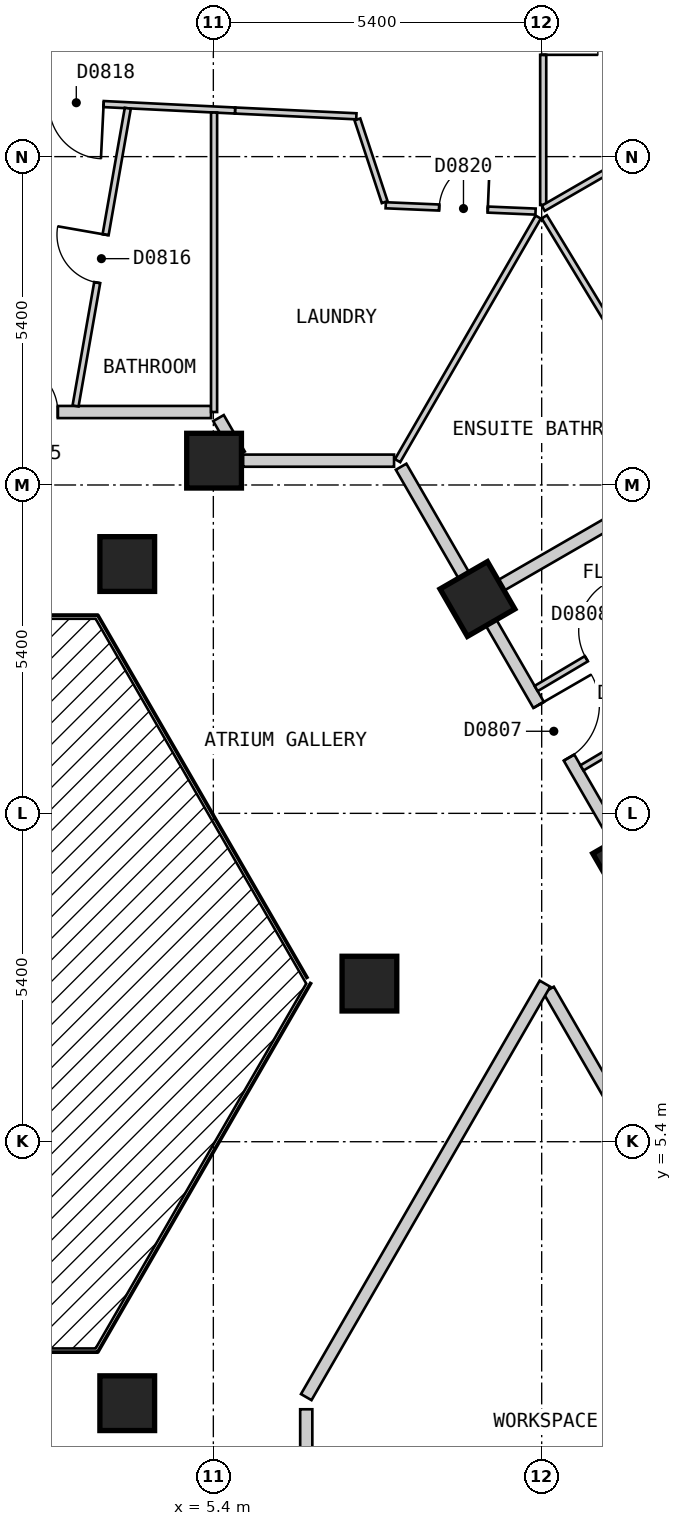
"""IFC4 building model, lengths in metres.
Left out: names, types, materials, properties, quantities, classifications, styles, units other than length and angle.
Written with IfcOpenShell. Run it as: python <this file> out.ifc"""

import sys

from ifc_helpers import new_model, si_unit, direction, frame, frame_2d, origin, origin_2d, place, context, subcontext, project, spatial, rectangle, extrude, element, fill, save


model = new_model("IFC4")
c1 = context("Model", 3, precision=1e-05, world=origin(), true_north=direction((0.0, 1.0)))
c2 = subcontext(c1, "Body", "Model", "MODEL_VIEW")
j1 = project(units=[si_unit("LENGTHUNIT", "METRE"), si_unit("PLANEANGLEUNIT", "RADIAN")], contexts=[c1])
p1 = place(None, origin())
s1 = spatial("IfcSite", under=j1, at=p1, CompositionType="ELEMENT")
p2 = place(p1, origin())
s2 = spatial("IfcBuilding", under=s1, at=p2, CompositionType="ELEMENT")
p3 = place(p2, frame((0.0, 0.0, 84.0)))
s3 = spatial("IfcBuildingStorey", under=s2, at=p3, CompositionType="ELEMENT", Elevation=84.0)
for number, where, z_axis, x_axis in (
    (1, (3.984, 1.1, 0.0), (0.0, 0.0, 1.0), (1.0, 0.0, 0.0)),
    (2, (12.255, 9.975, 0.0), (0.0, 0.0, 1.0), (-0.5, 0.866, 0.0)),
    (3, (7.967, 8.0, 0.0), (0.0, 0.0, 1.0), (1.0, 0.0, 0.0)),
    (4, (9.743, 14.325, 0.0), (0.0, 0.0, 1.0), (-0.5, 0.866, 0.0)),
    (5, (5.412, 16.6, 0.0), (0.0, 0.0, 1.0), (-1.0, 0.0, 0.0)),
    (6, (3.984, 14.9, 0.0), (0.0, 0.0, 1.0), (1.0, 0.0, 0.0)),
):
    element("IfcColumn", number, at=place(p3, frame(where, z_axis=z_axis, x_axis=x_axis)), inside=s3, PredefinedType="COLUMN", context=c2, shape_type="SweptSolid", body=[
        extrude(rectangle(XDim=0.9, YDim=0.9, at=origin_2d()), origin(), (0.0, 0.0, 1.0), 3.0),
    ])
p4 = place(p3, frame((5.485, 17.3, 0.0), z_axis=(0.0, 0.0, 1.0), x_axis=(0.499437640892, -0.866349838611, 0.0)))
e7 = element("IfcWall", 7, at=p4, inside=s3, PredefinedType="PARTITIONING", context=c2, shape_type="SweptSolid", body=[
    extrude(rectangle(XDim=0.693, YDim=0.2, at=frame_2d((0.346, 0.0))), origin(), (0.0, 0.0, 1.0), 2.7),
])
p5 = place(p3, frame((10.913, 7.899, 0.0), z_axis=(0.0, 0.0, 1.0), x_axis=(0.500028940566, -0.866008694296, 0.0)))
e8 = element("IfcWall", 8, at=p5, inside=s3, PredefinedType="PARTITIONING", context=c2, shape_type="SweptSolid", body=[
    extrude(rectangle(XDim=10.159, YDim=0.2, at=frame_2d((5.08, 0.0))), origin(), (0.0, 0.0, 1.0), 2.7),
])
p6 = place(p5, frame((4.63, 0.0, 0.0)))
e9 = element("IfcOpeningElement", 9, at=p6, cuts=e8, PredefinedType="OPENING", context=c2, shape_type="SweptSolid", body=[
    extrude(rectangle(XDim=0.9, YDim=2.1, at=frame_2d((0.45, 1.05))), frame((0.0, 0.11, 0.0), z_axis=(0.0, -1.0, 0.0), x_axis=(1.0, 0.0, 0.0)), (0.0, 0.0, 1.0), 0.22),
])
p7 = place(p3, frame((8.488, 16.5, 0.0), z_axis=(0.0, 0.0, 1.0), x_axis=(0.499986836607, -0.86603300354, 0.0)))
e10 = element("IfcWall", 10, at=p7, inside=s3, PredefinedType="PARTITIONING", context=c2, shape_type="SweptSolid", body=[
    extrude(rectangle(XDim=20.09, YDim=0.2, at=frame_2d((10.045, 0.0))), origin(), (0.0, 0.0, 1.0), 2.7),
])
p8 = place(p7, frame((4.523, 0.0, 0.0)))
e11 = element("IfcOpeningElement", 11, at=p8, cuts=e10, PredefinedType="OPENING", context=c2, shape_type="SweptSolid", body=[
    extrude(rectangle(XDim=1.0, YDim=2.1, at=frame_2d((0.5, 1.05))), frame((0.0, 0.11, 0.0), z_axis=(0.0, -1.0, 0.0), x_axis=(1.0, 0.0, 0.0)), (0.0, 0.0, 1.0), 0.22),
])
p9 = place(p3, frame((6.928, 1.0, 0.0), z_axis=(0.0, 0.0, 1.0), x_axis=(0.0, -1.0, 0.0)))
e12 = element("IfcWall", 12, at=p9, inside=s3, PredefinedType="PARTITIONING", context=c2, shape_type="SweptSolid", body=[
    extrude(rectangle(XDim=3.699, YDim=0.2, at=frame_2d((1.85, 0.0))), origin(), (0.0, 0.0, 1.0), 2.7),
])
p10 = place(p3, frame((5.889, 16.6, 0.0), z_axis=(0.0, 0.0, 1.0), x_axis=(1.0, 0.0, 0.0)))
e13 = element("IfcWall", 13, at=p10, inside=s3, PredefinedType="PARTITIONING", context=c2, shape_type="SweptSolid", body=[
    extrude(rectangle(XDim=2.483, YDim=0.2, at=frame_2d((1.242, 0.0))), origin(), (0.0, 0.0, 1.0), 2.7),
])
p11 = place(p3, frame((1.75, 17.4, 0.0), z_axis=(0.0, 0.0, 1.0), x_axis=(1.0, 0.0, 0.0)))
e14 = element("IfcWall", 14, at=p11, inside=s3, PredefinedType="PARTITIONING", context=c2, shape_type="SweptSolid", body=[
    extrude(rectangle(XDim=3.612, YDim=0.2, at=frame_2d((1.806, 0.0))), origin(), (0.0, 0.0, 1.0), 2.7),
])
p12 = place(p11, frame((0.292, 0.0, 0.0)))
e15 = element("IfcOpeningElement", 15, at=p12, cuts=e14, PredefinedType="OPENING", context=c2, shape_type="SweptSolid", body=[
    extrude(rectangle(XDim=0.8, YDim=2.1, at=frame_2d((0.4, 1.05))), frame((0.0, 0.11, 0.0), z_axis=(0.0, -1.0, 0.0), x_axis=(1.0, 0.0, 0.0)), (0.0, 0.0, 1.0), 0.22),
])
p13 = place(p3, frame((6.928, 1.2, 0.0), z_axis=(0.0, 0.0, 1.0), x_axis=(0.500055327065, 0.865993458332, 0.0)))
e16 = element("IfcWall", 16, at=p13, inside=s3, PredefinedType="PARTITIONING", context=c2, shape_type="SweptSolid", body=[
    extrude(rectangle(XDim=7.851, YDim=0.2, at=frame_2d((3.926, 0.0))), origin(), (0.0, 0.0, 1.0), 2.7),
])
p14 = place(p3, frame((7.769, 22.212, 0.0), z_axis=(0.0, 0.0, 1.0), x_axis=(0.313312924695, -0.949649941409, 0.0)))
e17 = element("IfcWall", 17, at=p14, inside=s3, PredefinedType="PARTITIONING", context=c2, shape_type="SweptSolid", body=[
    extrude(rectangle(XDim=1.433, YDim=0.1, at=frame_2d((0.717, 0.0))), origin(), (0.0, 0.0, 1.0), 2.7),
])
p15 = place(p3, frame((10.843, 20.61, 0.0), z_axis=(0.0, 0.0, 1.0), x_axis=(0.518481125811, -0.855089072657, 0.0)))
e18 = element("IfcWall", 18, at=p15, inside=s3, PredefinedType="PARTITIONING", context=c2, shape_type="SweptSolid", body=[
    extrude(rectangle(XDim=4.795, YDim=0.1, at=frame_2d((2.397, 0.0))), origin(), (0.0, 0.0, 1.0), 2.7),
])
p16 = place(p15, frame((1.999, 0.0, 0.0)))
e19 = element("IfcOpeningElement", 19, at=p16, cuts=e18, PredefinedType="OPENING", context=c2, shape_type="SweptSolid", body=[
    extrude(rectangle(XDim=0.8, YDim=2.1, at=frame_2d((0.4, 1.05))), frame((0.0, 0.06, 0.0), z_axis=(0.0, -1.0, 0.0), x_axis=(1.0, 0.0, 0.0)), (0.0, 0.0, 1.0), 0.12),
])
p17 = place(p3, frame((8.235, 20.8, 0.0), z_axis=(0.0, 0.0, 1.0), x_axis=(0.999110277005, -0.042174096116, 0.0)))
e20 = element("IfcWall", 20, at=p17, inside=s3, PredefinedType="PARTITIONING", context=c2, shape_type="SweptSolid", body=[
    extrude(rectangle(XDim=2.466, YDim=0.1, at=frame_2d((1.233, 0.0))), origin(), (0.0, 0.0, 1.0), 2.7),
])
p18 = place(p17, frame((0.88, 0.0, 0.0)))
e21 = element("IfcOpeningElement", 21, at=p18, cuts=e20, PredefinedType="OPENING", context=c2, shape_type="SweptSolid", body=[
    extrude(rectangle(XDim=0.8, YDim=2.1, at=frame_2d((0.4, 1.05))), frame((0.0, 0.06, 0.0), z_axis=(0.0, -1.0, 0.0), x_axis=(1.0, 0.0, 0.0)), (0.0, 0.0, 1.0), 0.12),
])
p19 = place(p3, frame((5.757, 22.358, 0.0), z_axis=(0.0, 0.0, 1.0), x_axis=(0.998868690804, -0.047553533316, 0.0)))
e22 = element("IfcWall", 22, at=p19, inside=s3, PredefinedType="PARTITIONING", context=c2, shape_type="SweptSolid", body=[
    extrude(rectangle(XDim=1.997, YDim=0.1, at=frame_2d((0.999, 0.0))), origin(), (0.0, 0.0, 1.0), 2.7),
])
p20 = place(p3, frame((2.321, 22.527, 0.0), z_axis=(0.0, 0.0, 1.0), x_axis=(0.998789924329, -0.049180149038, 0.0)))
e23 = element("IfcWall", 23, at=p20, inside=s3, PredefinedType="PARTITIONING", context=c2, shape_type="SweptSolid", body=[
    extrude(rectangle(XDim=3.44, YDim=0.1, at=frame_2d((1.72, 0.0))), origin(), (0.0, 0.0, 1.0), 2.7),
])
p21 = place(p20, frame((0.376, 0.0, 0.0)))
e24 = element("IfcOpeningElement", 24, at=p21, cuts=e23, PredefinedType="OPENING", context=c2, shape_type="SweptSolid", body=[
    extrude(rectangle(XDim=0.9, YDim=2.1, at=frame_2d((0.45, 1.05))), frame((0.0, 0.06, 0.0), z_axis=(0.0, -1.0, 0.0), x_axis=(1.0, 0.0, 0.0)), (0.0, 0.0, 1.0), 0.12),
])
p22 = place(p3, frame((8.43, 16.6, 0.0), z_axis=(0.0, 0.0, 1.0), x_axis=(0.50003312339, 0.866006279142, 0.0)))
e25 = element("IfcWall", 25, at=p22, inside=s3, PredefinedType="PARTITIONING", context=c2, shape_type="SweptSolid", body=[
    extrude(rectangle(XDim=4.626, YDim=0.1, at=frame_2d((2.313, 0.0))), origin(), (0.0, 0.0, 1.0), 2.7),
])
p23 = place(p3, frame((3.134, 17.5, 0.0), z_axis=(0.0, 0.0, 1.0), x_axis=(0.172821216702, 0.984953210593, 0.0)))
e26 = element("IfcWall", 26, at=p23, inside=s3, PredefinedType="PARTITIONING", context=c2, shape_type="SweptSolid", body=[
    extrude(rectangle(XDim=4.97, YDim=0.1, at=frame_2d((2.485, 0.0))), origin(), (0.0, 0.0, 1.0), 2.7),
])
p24 = place(p23, frame((2.059, 0.0, 0.0)))
e27 = element("IfcOpeningElement", 27, at=p24, cuts=e26, PredefinedType="OPENING", context=c2, shape_type="SweptSolid", body=[
    extrude(rectangle(XDim=0.8, YDim=2.1, at=frame_2d((0.4, 1.05))), frame((0.0, 0.06, 0.0), z_axis=(0.0, -1.0, 0.0), x_axis=(1.0, 0.0, 0.0)), (0.0, 0.0, 1.0), 0.12),
])
p25 = place(p3, frame((5.412, 17.4, 0.0), z_axis=(0.0, 0.0, 1.0), x_axis=(0.0, 1.0, 0.0)))
e28 = element("IfcWall", 28, at=p25, inside=s3, PredefinedType="PARTITIONING", context=c2, shape_type="SweptSolid", body=[
    extrude(rectangle(XDim=4.925, YDim=0.1, at=frame_2d((2.462, 0.0))), origin(), (0.0, 0.0, 1.0), 2.7),
])
p26 = place(p3, frame((10.825, 20.806, 0.0), z_axis=(0.0, 0.0, 1.0), x_axis=(0.0, 1.0, 0.0)))
e29 = element("IfcWall", 29, at=p26, inside=s3, PredefinedType="PARTITIONING", context=c2, shape_type="SweptSolid", body=[
    extrude(rectangle(XDim=5.894, YDim=0.1, at=frame_2d((2.947, 0.0))), origin(), (0.0, 0.0, 1.0), 2.7),
])
p27 = place(p26, frame((2.468, 0.0, 0.0)))
e30 = element("IfcOpeningElement", 30, at=p27, cuts=e29, PredefinedType="OPENING", context=c2, shape_type="SweptSolid", body=[
    extrude(rectangle(XDim=0.9, YDim=2.1, at=frame_2d((0.45, 1.05))), frame((0.0, 0.06, 0.0), z_axis=(0.0, -1.0, 0.0), x_axis=(1.0, 0.0, 0.0)), (0.0, 0.0, 1.0), 0.12),
])
p28 = place(p3, frame((10.826, 20.75, 0.0), z_axis=(0.0, 0.0, 1.0), x_axis=(0.865986712877, 0.50006700863, 0.0)))
e31 = element("IfcWall", 31, at=p28, inside=s3, PredefinedType="PARTITIONING", context=c2, shape_type="SweptSolid", body=[
    extrude(rectangle(XDim=5.949, YDim=0.1, at=frame_2d((2.975, 0.0))), origin(), (0.0, 0.0, 1.0), 2.7),
])
p29 = place(p28, frame((2.524, 0.0, 0.0)))
e32 = element("IfcOpeningElement", 32, at=p29, cuts=e31, PredefinedType="OPENING", context=c2, shape_type="SweptSolid", body=[
    extrude(rectangle(XDim=0.9, YDim=2.1, at=frame_2d((0.45, 1.05))), frame((0.0, 0.06, 0.0), z_axis=(0.0, -1.0, 0.0), x_axis=(1.0, 0.0, 0.0)), (0.0, 0.0, 1.0), 0.12),
])
p30 = place(p3, frame((11.462, 11.548, 0.0), z_axis=(0.0, 0.0, 1.0), x_axis=(0.860106181478, 0.510115042498, 0.0)))
e33 = element("IfcWall", 33, at=p30, inside=s3, PredefinedType="PARTITIONING", context=c2, shape_type="SweptSolid", body=[
    extrude(rectangle(XDim=2.889, YDim=0.1, at=frame_2d((1.445, 0.0))), origin(), (0.0, 0.0, 1.0), 2.7),
])
p31 = place(p30, frame((1.019, 0.0, 0.0)))
e34 = element("IfcOpeningElement", 34, at=p31, cuts=e33, PredefinedType="OPENING", context=c2, shape_type="SweptSolid", body=[
    extrude(rectangle(XDim=0.8, YDim=2.1, at=frame_2d((0.4, 1.05))), frame((0.0, 0.06, 0.0), z_axis=(0.0, -1.0, 0.0), x_axis=(1.0, 0.0, 0.0)), (0.0, 0.0, 1.0), 0.12),
])
p32 = place(p3, frame((10.709, 12.853, 0.0), z_axis=(0.0, 0.0, 1.0), x_axis=(0.859991215576, 0.510308837011, 0.0)))
e35 = element("IfcWall", 35, at=p32, inside=s3, PredefinedType="PARTITIONING", context=c2, shape_type="SweptSolid", body=[
    extrude(rectangle(XDim=2.92, YDim=0.1, at=frame_2d((1.46, 0.0))), origin(), (0.0, 0.0, 1.0), 2.7),
])
p33 = place(p32, frame((0.96, 0.0, 0.0)))
e36 = element("IfcOpeningElement", 36, at=p33, cuts=e35, PredefinedType="OPENING", context=c2, shape_type="SweptSolid", body=[
    extrude(rectangle(XDim=0.9, YDim=2.1, at=frame_2d((0.45, 1.05))), frame((0.0, 0.06, 0.0), z_axis=(0.0, -1.0, 0.0), x_axis=(1.0, 0.0, 0.0)), (0.0, 0.0, 1.0), 0.12),
])
p34 = place(p3, frame((9.83, 14.375, 0.0), z_axis=(0.0, 0.0, 1.0), x_axis=(0.865992435864, 0.500057097767, 0.0)))
e37 = element("IfcWall", 37, at=p34, inside=s3, PredefinedType="PARTITIONING", context=c2, shape_type="SweptSolid", body=[
    extrude(rectangle(XDim=9.999, YDim=0.2, at=frame_2d((5.0, 0.0))), origin(), (0.0, 0.0, 1.0), 2.7),
])
p35 = place(p8, origin())
e38 = element("IfcDoor", 38, at=p35, inside=s3, OperationType="SINGLE_SWING_LEFT", PredefinedType="DOOR", context=c2, shape_type="SweptSolid", body=[
    extrude(rectangle(XDim=1.0, YDim=2.1, at=frame_2d((0.5, 1.05))), frame((0.0, 0.025, 0.0), z_axis=(0.0, -1.0, 0.0), x_axis=(1.0, 0.0, 0.0)), (0.0, 0.0, 1.0), 0.05),
])
fill(e11, e38)
p36 = place(p33, origin())
e39 = element("IfcDoor", 39, at=p36, inside=s3, OperationType="SINGLE_SWING_RIGHT", PredefinedType="DOOR", context=c2, shape_type="SweptSolid", body=[
    extrude(rectangle(XDim=0.9, YDim=2.1, at=frame_2d((0.45, 1.05))), frame((0.0, 0.025, 0.0), z_axis=(0.0, -1.0, 0.0), x_axis=(1.0, 0.0, 0.0)), (0.0, 0.0, 1.0), 0.05),
])
fill(e36, e39)
p37 = place(p12, origin())
e40 = element("IfcDoor", 40, at=p37, inside=s3, OperationType="SINGLE_SWING_LEFT", PredefinedType="DOOR", context=c2, shape_type="SweptSolid", body=[
    extrude(rectangle(XDim=0.8, YDim=2.1, at=frame_2d((0.4, 1.05))), frame((0.0, 0.025, 0.0), z_axis=(0.0, -1.0, 0.0), x_axis=(1.0, 0.0, 0.0)), (0.0, 0.0, 1.0), 0.05),
])
fill(e15, e40)
p38 = place(p24, origin())
e41 = element("IfcDoor", 41, at=p38, inside=s3, OperationType="SINGLE_SWING_RIGHT", PredefinedType="DOOR", context=c2, shape_type="SweptSolid", body=[
    extrude(rectangle(XDim=0.8, YDim=2.1, at=frame_2d((0.4, 1.05))), frame((0.0, 0.025, 0.0), z_axis=(0.0, -1.0, 0.0), x_axis=(1.0, 0.0, 0.0)), (0.0, 0.0, 1.0), 0.05),
])
fill(e27, e41)
p39 = place(p21, origin())
e42 = element("IfcDoor", 42, at=p39, inside=s3, OperationType="SINGLE_SWING_RIGHT", PredefinedType="DOOR", context=c2, shape_type="SweptSolid", body=[
    extrude(rectangle(XDim=0.9, YDim=2.1, at=frame_2d((0.45, 1.05))), frame((0.0, 0.025, 0.0), z_axis=(0.0, -1.0, 0.0), x_axis=(1.0, 0.0, 0.0)), (0.0, 0.0, 1.0), 0.05),
])
fill(e24, e42)
p40 = place(p27, origin())
e43 = element("IfcDoor", 43, at=p40, inside=s3, OperationType="SINGLE_SWING_LEFT", PredefinedType="DOOR", context=c2, shape_type="SweptSolid", body=[
    extrude(rectangle(XDim=0.9, YDim=2.1, at=frame_2d((0.45, 1.05))), frame((0.0, 0.025, 0.0), z_axis=(0.0, -1.0, 0.0), x_axis=(1.0, 0.0, 0.0)), (0.0, 0.0, 1.0), 0.05),
])
fill(e30, e43)
p41 = place(p18, origin())
e44 = element("IfcDoor", 44, at=p41, inside=s3, OperationType="SINGLE_SWING_RIGHT", PredefinedType="DOOR", context=c2, shape_type="SweptSolid", body=[
    extrude(rectangle(XDim=0.8, YDim=2.1, at=frame_2d((0.4, 1.05))), frame((0.0, 0.025, 0.0), z_axis=(0.0, -1.0, 0.0), x_axis=(1.0, 0.0, 0.0)), (0.0, 0.0, 1.0), 0.05),
])
fill(e21, e44)
save(model, sys.argv[1])
